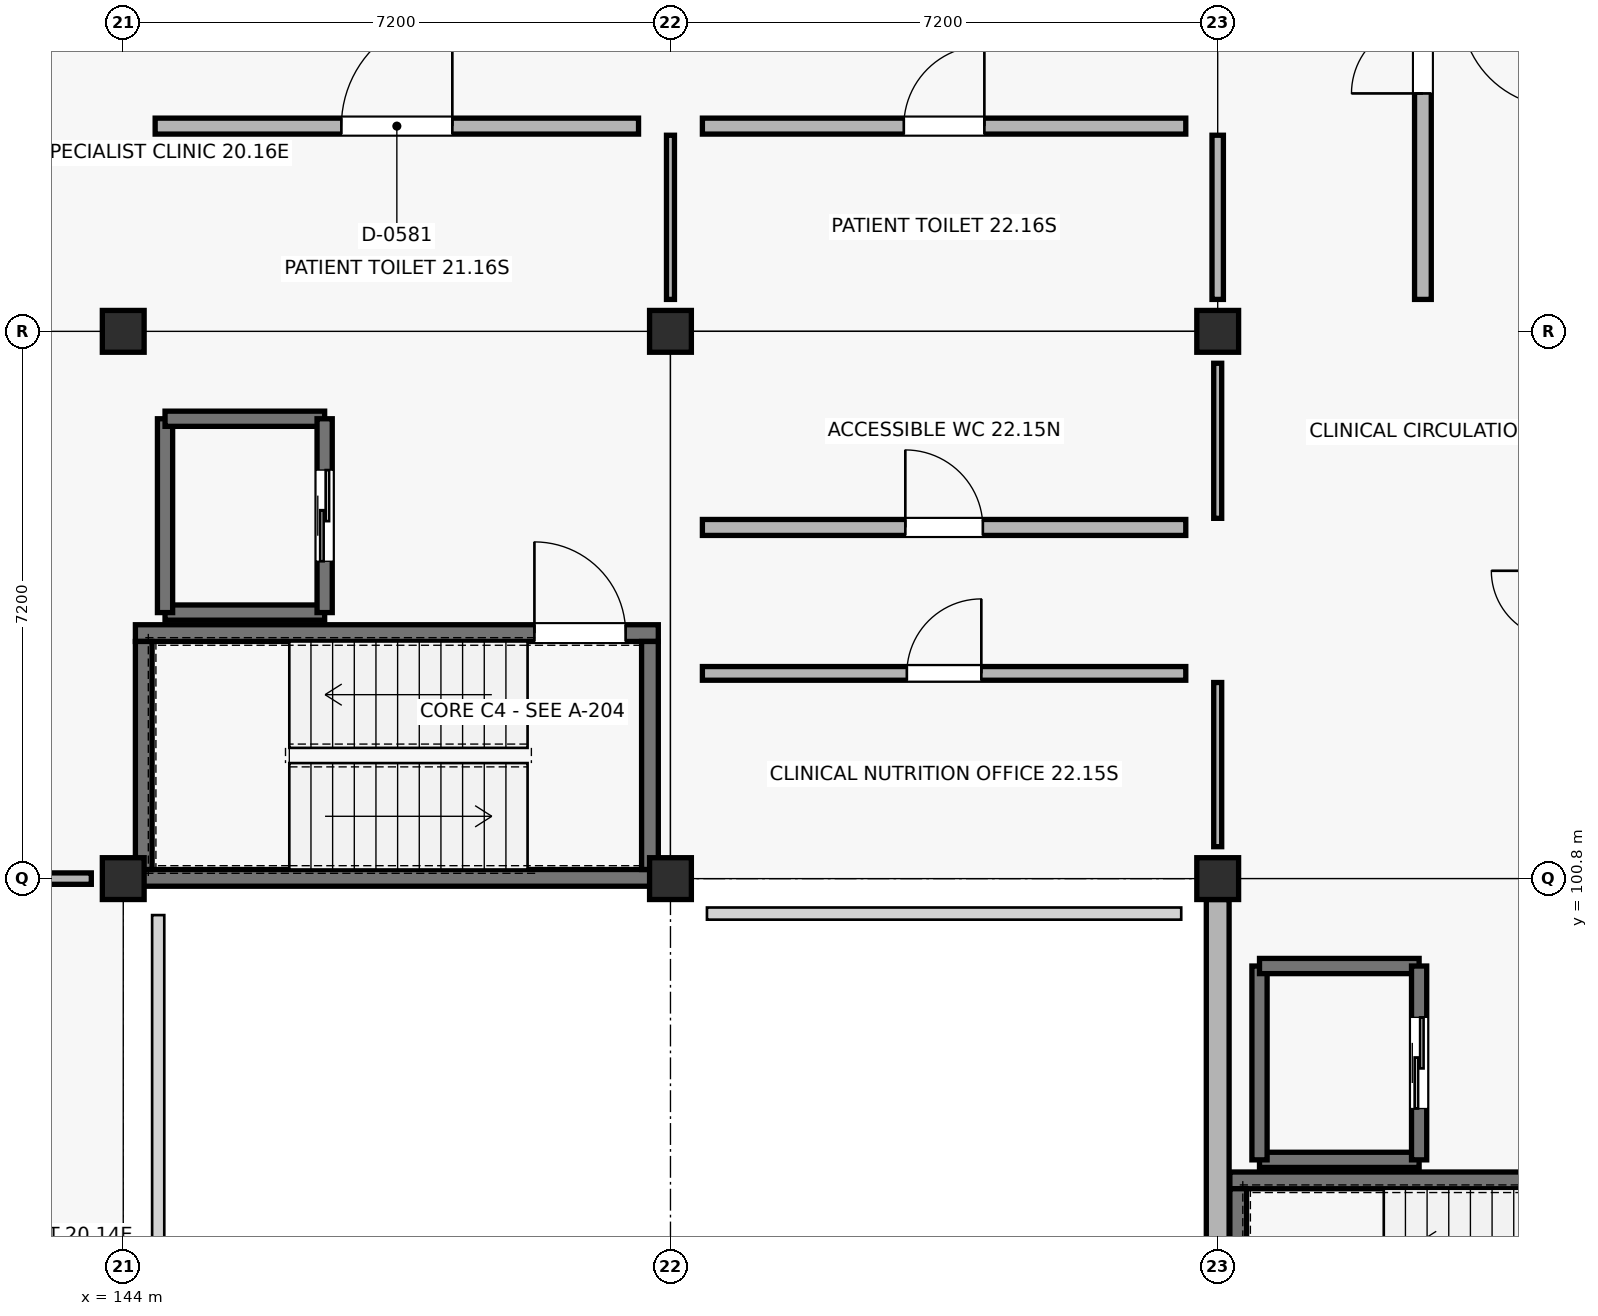
"""IFC4 building model, lengths in metres.
Left out: names, types, materials, properties, quantities, classifications, styles, units other than length and angle.
Written with IfcOpenShell. Run it as: python <this file> out.ifc"""

import sys

from ifc_helpers import new_model, si_unit, direction, frame, frame_2d, origin, origin_2d, place, context, subcontext, project, spatial, rectangle, extrude, element, fill, save


model = new_model("IFC4")
c1 = context("Model", 3, precision=1e-05, world=origin(), true_north=direction((0.0, 1.0)))
c2 = subcontext(c1, "Body", "Model", "MODEL_VIEW")
j1 = project(units=[si_unit("LENGTHUNIT", "METRE"), si_unit("PLANEANGLEUNIT", "RADIAN")], contexts=[c1])
p1 = place(None, origin())
s1 = spatial("IfcSite", under=j1, at=p1, CompositionType="ELEMENT")
p2 = place(p1, origin())
s2 = spatial("IfcBuilding", under=s1, at=p2, CompositionType="ELEMENT")
p3 = place(p2, frame((0.0, 0.0, 13.5)))
s3 = spatial("IfcBuildingStorey", under=s2, at=p3, CompositionType="ELEMENT", Elevation=13.5)
for number, where, z_axis, x_axis in (
    (1, (144.0, 100.8, 0.0), (0.0, 0.0, 1.0), (1.0, 0.0, 0.0)),
    (2, (144.0, 108.0, 0.0), (0.0, 0.0, 1.0), (1.0, 0.0, 0.0)),
    (3, (151.2, 100.8, 0.0), (0.0, 0.0, 1.0), (1.0, 0.0, 0.0)),
    (4, (151.2, 108.0, 0.0), (0.0, 0.0, 1.0), (1.0, 0.0, 0.0)),
    (5, (158.4, 100.8, 0.0), (0.0, 0.0, 1.0), (1.0, 0.0, 0.0)),
    (6, (158.4, 108.0, 0.0), (0.0, 0.0, 1.0), (1.0, 0.0, 0.0)),
):
    element("IfcColumn", number, at=place(p3, frame(where, z_axis=z_axis, x_axis=x_axis)), inside=s3, PredefinedType="COLUMN", context=c2, shape_type="SweptSolid", body=[
        extrude(rectangle(XDim=0.55, YDim=0.55, at=origin_2d()), origin(), (0.0, 0.0, 1.0), 4.05),
    ])
p4 = place(p3, frame((158.4, 100.525, 0.0), z_axis=(0.0, 0.0, 1.0), x_axis=(0.0, -1.0, 0.0)))
e7 = element("IfcWall", 7, at=p4, inside=s3, PredefinedType="STANDARD", context=c2, shape_type="SweptSolid", body=[
    extrude(rectangle(XDim=6.65, YDim=0.3, at=frame_2d((3.325, 0.0))), origin(), (0.0, 0.0, 1.0), 3.24),
])
p5 = place(p3, frame((158.56, 96.83, 0.0), z_axis=(0.0, 0.0, 1.0), x_axis=(1.0, 0.0, 0.0)))
e8 = element("IfcWall", 8, at=p5, inside=s3, PredefinedType="SHEAR", context=c2, shape_type="SweptSolid", body=[
    extrude(rectangle(XDim=6.88, YDim=0.22, at=frame_2d((3.44, 0.0))), origin(), (0.0, 0.0, 1.0), 3.79),
])
p6 = place(p5, frame((5.25, 0.0, 0.0)))
e9 = element("IfcOpeningElement", 9, at=p6, cuts=e8, PredefinedType="OPENING", context=c2, shape_type="SweptSolid", body=[
    extrude(rectangle(XDim=1.2, YDim=2.15, at=frame_2d((0.6, 1.075))), frame((0.0, 0.12, 0.0), z_axis=(0.0, -1.0, 0.0), x_axis=(1.0, 0.0, 0.0)), (0.0, 0.0, 1.0), 0.24),
])
p7 = place(p3, frame((158.67, 93.72, 0.0), z_axis=(0.0, 0.0, 1.0), x_axis=(0.0, 1.0, 0.0)))
e10 = element("IfcWall", 10, at=p7, inside=s3, PredefinedType="SHEAR", context=c2, shape_type="SweptSolid", body=[
    extrude(rectangle(XDim=3.0, YDim=0.22, at=frame_2d((1.5, 0.0))), origin(), (0.0, 0.0, 1.0), 3.79),
])
p8 = place(p3, frame((158.95, 97.1, 0.0), z_axis=(0.0, 0.0, 1.0), x_axis=(1.0, 0.0, 0.0)))
e11 = element("IfcWall", 11, at=p8, inside=s3, PredefinedType="SHEAR", context=c2, shape_type="SweptSolid", body=[
    extrude(rectangle(XDim=2.1, YDim=0.2, at=frame_2d((1.05, 0.0))), origin(), (0.0, 0.0, 1.0), 3.79),
])
p9 = place(p3, frame((158.95, 97.1, 0.0), z_axis=(0.0, 0.0, 1.0), x_axis=(0.0, 1.0, 0.0)))
e12 = element("IfcWall", 12, at=p9, inside=s3, PredefinedType="SHEAR", context=c2, shape_type="SweptSolid", body=[
    extrude(rectangle(XDim=2.55, YDim=0.2, at=frame_2d((1.275, 0.0))), origin(), (0.0, 0.0, 1.0), 3.79),
])
p10 = place(p3, frame((158.95, 99.65, 0.0), z_axis=(0.0, 0.0, 1.0), x_axis=(1.0, 0.0, 0.0)))
e13 = element("IfcWall", 13, at=p10, inside=s3, PredefinedType="SHEAR", context=c2, shape_type="SweptSolid", body=[
    extrude(rectangle(XDim=2.1, YDim=0.2, at=frame_2d((1.05, 0.0))), origin(), (0.0, 0.0, 1.0), 3.79),
])
p11 = place(p3, frame((161.05, 97.1, 0.0), z_axis=(0.0, 0.0, 1.0), x_axis=(0.0, 1.0, 0.0)))
e14 = element("IfcWall", 14, at=p11, inside=s3, PredefinedType="SHEAR", context=c2, shape_type="SweptSolid", body=[
    extrude(rectangle(XDim=2.55, YDim=0.2, at=frame_2d((1.275, 0.0))), origin(), (0.0, 0.0, 1.0), 3.79),
])
p12 = place(p11, frame((0.675, 0.0, 0.0)))
e15 = element("IfcOpeningElement", 15, at=p12, cuts=e14, PredefinedType="OPENING", context=c2, shape_type="SweptSolid", body=[
    extrude(rectangle(XDim=1.2, YDim=2.15, at=frame_2d((0.6, 1.075))), frame((0.0, 0.11, 0.0), z_axis=(0.0, -1.0, 0.0), x_axis=(1.0, 0.0, 0.0)), (0.0, 0.0, 1.0), 0.22),
])
p13 = place(p3, frame((144.16, 100.81, 0.0), z_axis=(0.0, 0.0, 1.0), x_axis=(1.0, 0.0, 0.0)))
e16 = element("IfcWall", 16, at=p13, inside=s3, PredefinedType="SHEAR", context=c2, shape_type="SweptSolid", body=[
    extrude(rectangle(XDim=6.88, YDim=0.22, at=frame_2d((3.44, 0.0))), origin(), (0.0, 0.0, 1.0), 3.79),
])
p14 = place(p3, frame((144.16, 104.03, 0.0), z_axis=(0.0, 0.0, 1.0), x_axis=(1.0, 0.0, 0.0)))
e17 = element("IfcWall", 17, at=p14, inside=s3, PredefinedType="SHEAR", context=c2, shape_type="SweptSolid", body=[
    extrude(rectangle(XDim=6.88, YDim=0.22, at=frame_2d((3.44, 0.0))), origin(), (0.0, 0.0, 1.0), 3.79),
])
p15 = place(p14, frame((5.25, 0.0, 0.0)))
e18 = element("IfcOpeningElement", 18, at=p15, cuts=e17, PredefinedType="OPENING", context=c2, shape_type="SweptSolid", body=[
    extrude(rectangle(XDim=1.2, YDim=2.15, at=frame_2d((0.6, 1.075))), frame((0.0, 0.12, 0.0), z_axis=(0.0, -1.0, 0.0), x_axis=(1.0, 0.0, 0.0)), (0.0, 0.0, 1.0), 0.24),
])
for number, where, z_axis, x_axis in (
    (19, (144.27, 100.92, 0.0), (0.0, 0.0, 1.0), (0.0, 1.0, 0.0)),
    (20, (150.93, 100.92, 0.0), (0.0, 0.0, 1.0), (0.0, 1.0, 0.0)),
):
    element("IfcWall", number, at=place(p3, frame(where, z_axis=z_axis, x_axis=x_axis)), inside=s3, PredefinedType="SHEAR", context=c2, shape_type="SweptSolid", body=[
        extrude(rectangle(XDim=3.0, YDim=0.22, at=frame_2d((1.5, 0.0))), origin(), (0.0, 0.0, 1.0), 3.79),
    ])
p16 = place(p3, frame((144.55, 104.3, 0.0), z_axis=(0.0, 0.0, 1.0), x_axis=(1.0, 0.0, 0.0)))
e21 = element("IfcWall", 21, at=p16, inside=s3, PredefinedType="SHEAR", context=c2, shape_type="SweptSolid", body=[
    extrude(rectangle(XDim=2.1, YDim=0.2, at=frame_2d((1.05, 0.0))), origin(), (0.0, 0.0, 1.0), 3.79),
])
p17 = place(p3, frame((144.55, 104.3, 0.0), z_axis=(0.0, 0.0, 1.0), x_axis=(0.0, 1.0, 0.0)))
e22 = element("IfcWall", 22, at=p17, inside=s3, PredefinedType="SHEAR", context=c2, shape_type="SweptSolid", body=[
    extrude(rectangle(XDim=2.55, YDim=0.2, at=frame_2d((1.275, 0.0))), origin(), (0.0, 0.0, 1.0), 3.79),
])
p18 = place(p3, frame((144.55, 106.85, 0.0), z_axis=(0.0, 0.0, 1.0), x_axis=(1.0, 0.0, 0.0)))
e23 = element("IfcWall", 23, at=p18, inside=s3, PredefinedType="SHEAR", context=c2, shape_type="SweptSolid", body=[
    extrude(rectangle(XDim=2.1, YDim=0.2, at=frame_2d((1.05, 0.0))), origin(), (0.0, 0.0, 1.0), 3.79),
])
p19 = place(p3, frame((146.65, 104.3, 0.0), z_axis=(0.0, 0.0, 1.0), x_axis=(0.0, 1.0, 0.0)))
e24 = element("IfcWall", 24, at=p19, inside=s3, PredefinedType="SHEAR", context=c2, shape_type="SweptSolid", body=[
    extrude(rectangle(XDim=2.55, YDim=0.2, at=frame_2d((1.275, 0.0))), origin(), (0.0, 0.0, 1.0), 3.79),
])
p20 = place(p19, frame((0.675, 0.0, 0.0)))
e25 = element("IfcOpeningElement", 25, at=p20, cuts=e24, PredefinedType="OPENING", context=c2, shape_type="SweptSolid", body=[
    extrude(rectangle(XDim=1.2, YDim=2.15, at=frame_2d((0.6, 1.075))), frame((0.0, 0.11, 0.0), z_axis=(0.0, -1.0, 0.0), x_axis=(1.0, 0.0, 0.0)), (0.0, 0.0, 1.0), 0.22),
])
p21 = place(p3, frame((141.42, 100.8, 0.0), z_axis=(0.0, 0.0, 1.0), x_axis=(1.0, 0.0, 0.0)))
e26 = element("IfcWall", 26, at=p21, inside=s3, PredefinedType="PARTITIONING", context=c2, shape_type="SweptSolid", body=[
    extrude(rectangle(XDim=2.16, YDim=0.15, at=frame_2d((1.08, 0.0))), origin(), (0.0, 0.0, 1.0), 2.93),
])
p22 = place(p3, frame((144.42, 110.7, 0.0), z_axis=(0.0, 0.0, 1.0), x_axis=(1.0, 0.0, 0.0)))
e27 = element("IfcWall", 27, at=p22, inside=s3, PredefinedType="PLUMBINGWALL", context=c2, shape_type="SweptSolid", body=[
    extrude(rectangle(XDim=6.36, YDim=0.21, at=frame_2d((3.18, 0.0))), origin(), (0.0, 0.0, 1.0), 2.93),
])
p23 = place(p22, frame((2.45, 0.0, 0.0)))
e28 = element("IfcOpeningElement", 28, at=p23, cuts=e27, PredefinedType="OPENING", context=c2, shape_type="SweptSolid", body=[
    extrude(rectangle(XDim=1.46, YDim=2.04, at=frame_2d((0.73, 1.02))), frame((0.0, 0.115, 0.0), z_axis=(0.0, -1.0, 0.0), x_axis=(1.0, 0.0, 0.0)), (0.0, 0.0, 1.0), 0.23),
])
p24 = place(p3, frame((151.2, 108.42, 0.0), z_axis=(0.0, 0.0, 1.0), x_axis=(0.0, 1.0, 0.0)))
e29 = element("IfcWall", 29, at=p24, inside=s3, PredefinedType="PARTITIONING", context=c2, shape_type="SweptSolid", body=[
    extrude(rectangle(XDim=2.16, YDim=0.105, at=frame_2d((1.08, 0.0))), origin(), (0.0, 0.0, 1.0), 2.93),
])
p25 = place(p3, frame((151.62, 103.5, 0.0), z_axis=(0.0, 0.0, 1.0), x_axis=(1.0, 0.0, 0.0)))
e30 = element("IfcWall", 30, at=p25, inside=s3, PredefinedType="PARTITIONING", context=c2, shape_type="SweptSolid", body=[
    extrude(rectangle(XDim=6.36, YDim=0.18, at=frame_2d((3.18, 0.0))), origin(), (0.0, 0.0, 1.0), 2.93),
])
p26 = place(p25, frame((2.69, 0.0, 0.0)))
e31 = element("IfcOpeningElement", 31, at=p26, cuts=e30, PredefinedType="OPENING", context=c2, shape_type="SweptSolid", body=[
    extrude(rectangle(XDim=0.98, YDim=2.09, at=frame_2d((0.49, 1.045))), frame((0.0, 0.1, 0.0), z_axis=(0.0, -1.0, 0.0), x_axis=(1.0, 0.0, 0.0)), (0.0, 0.0, 1.0), 0.2),
])
p27 = place(p3, frame((158.4, 101.22, 0.0), z_axis=(0.0, 0.0, 1.0), x_axis=(0.0, 1.0, 0.0)))
e32 = element("IfcWall", 32, at=p27, inside=s3, PredefinedType="PARTITIONING", context=c2, shape_type="SweptSolid", body=[
    extrude(rectangle(XDim=2.16, YDim=0.105, at=frame_2d((1.08, 0.0))), origin(), (0.0, 0.0, 1.0), 2.93),
])
p28 = place(p3, frame((151.62, 105.42, 0.0), z_axis=(0.0, 0.0, 1.0), x_axis=(1.0, 0.0, 0.0)))
e33 = element("IfcWall", 33, at=p28, inside=s3, PredefinedType="PLUMBINGWALL", context=c2, shape_type="SweptSolid", body=[
    extrude(rectangle(XDim=6.36, YDim=0.21, at=frame_2d((3.18, 0.0))), origin(), (0.0, 0.0, 1.0), 2.93),
])
p29 = place(p28, frame((2.67, 0.0, 0.0)))
e34 = element("IfcOpeningElement", 34, at=p29, cuts=e33, PredefinedType="OPENING", context=c2, shape_type="SweptSolid", body=[
    extrude(rectangle(XDim=1.02, YDim=2.09, at=frame_2d((0.51, 1.045))), frame((0.0, 0.115, 0.0), z_axis=(0.0, -1.0, 0.0), x_axis=(1.0, 0.0, 0.0)), (0.0, 0.0, 1.0), 0.23),
])
p30 = place(p3, frame((158.4, 105.54, 0.0), z_axis=(0.0, 0.0, 1.0), x_axis=(0.0, 1.0, 0.0)))
e35 = element("IfcWall", 35, at=p30, inside=s3, PredefinedType="PARTITIONING", context=c2, shape_type="SweptSolid", body=[
    extrude(rectangle(XDim=2.04, YDim=0.105, at=frame_2d((1.02, 0.0))), origin(), (0.0, 0.0, 1.0), 2.93),
])
p31 = place(p3, frame((151.62, 110.7, 0.0), z_axis=(0.0, 0.0, 1.0), x_axis=(1.0, 0.0, 0.0)))
e36 = element("IfcWall", 36, at=p31, inside=s3, PredefinedType="PLUMBINGWALL", context=c2, shape_type="SweptSolid", body=[
    extrude(rectangle(XDim=6.36, YDim=0.21, at=frame_2d((3.18, 0.0))), origin(), (0.0, 0.0, 1.0), 2.93),
])
p32 = place(p31, frame((2.65, 0.0, 0.0)))
e37 = element("IfcOpeningElement", 37, at=p32, cuts=e36, PredefinedType="OPENING", context=c2, shape_type="SweptSolid", body=[
    extrude(rectangle(XDim=1.06, YDim=2.09, at=frame_2d((0.53, 1.045))), frame((0.0, 0.115, 0.0), z_axis=(0.0, -1.0, 0.0), x_axis=(1.0, 0.0, 0.0)), (0.0, 0.0, 1.0), 0.23),
])
p33 = place(p3, frame((158.4, 108.42, 0.0), z_axis=(0.0, 0.0, 1.0), x_axis=(0.0, 1.0, 0.0)))
e38 = element("IfcWall", 38, at=p33, inside=s3, PredefinedType="PARTITIONING", context=c2, shape_type="SweptSolid", body=[
    extrude(rectangle(XDim=2.16, YDim=0.15, at=frame_2d((1.08, 0.0))), origin(), (0.0, 0.0, 1.0), 2.93),
])
p34 = place(p3, frame((161.1, 108.42, 0.0), z_axis=(0.0, 0.0, 1.0), x_axis=(0.0, 1.0, 0.0)))
e39 = element("IfcWall", 39, at=p34, inside=s3, PredefinedType="SOLIDWALL", context=c2, shape_type="SweptSolid", body=[
    extrude(rectangle(XDim=6.36, YDim=0.22, at=frame_2d((3.18, 0.0))), origin(), (0.0, 0.0, 1.0), 2.93),
])
p35 = place(p34, frame((2.71, 0.0, 0.0)))
e40 = element("IfcOpeningElement", 40, at=p35, cuts=e39, PredefinedType="OPENING", context=c2, shape_type="SweptSolid", body=[
    extrude(rectangle(XDim=0.94, YDim=2.14, at=frame_2d((0.47, 1.07))), frame((0.0, 0.12, 0.0), z_axis=(0.0, -1.0, 0.0), x_axis=(1.0, 0.0, 0.0)), (0.0, 0.0, 1.0), 0.24),
])
p36 = place(p12, origin())
e41 = element("IfcDoor", 41, at=p36, inside=s3, OperationType="SLIDING_TO_LEFT", PredefinedType="DOOR", context=c2, shape_type="SweptSolid", body=[
    extrude(rectangle(XDim=1.2, YDim=2.15, at=frame_2d((0.6, 1.075))), frame((0.0, 0.025, 0.0), z_axis=(0.0, -1.0, 0.0), x_axis=(1.0, 0.0, 0.0)), (0.0, 0.0, 1.0), 0.05),
])
fill(e15, e41)
p37 = place(p15, origin())
e42 = element("IfcDoor", 42, at=p37, inside=s3, OperationType="SINGLE_SWING_LEFT", PredefinedType="DOOR", context=c2, shape_type="SweptSolid", body=[
    extrude(rectangle(XDim=1.2, YDim=2.15, at=frame_2d((0.6, 1.075))), frame((0.0, 0.025, 0.0), z_axis=(0.0, -1.0, 0.0), x_axis=(1.0, 0.0, 0.0)), (0.0, 0.0, 1.0), 0.05),
])
fill(e18, e42)
p38 = place(p20, origin())
e43 = element("IfcDoor", 43, at=p38, inside=s3, OperationType="SLIDING_TO_LEFT", PredefinedType="DOOR", context=c2, shape_type="SweptSolid", body=[
    extrude(rectangle(XDim=1.2, YDim=2.15, at=frame_2d((0.6, 1.075))), frame((0.0, 0.025, 0.0), z_axis=(0.0, -1.0, 0.0), x_axis=(1.0, 0.0, 0.0)), (0.0, 0.0, 1.0), 0.05),
])
fill(e25, e43)
p39 = place(p23, origin())
e44 = element("IfcDoor", 44, at=p39, inside=s3, OperationType="SINGLE_SWING_RIGHT", PredefinedType="DOOR", context=c2, shape_type="SweptSolid", body=[
    extrude(rectangle(XDim=1.46, YDim=2.04, at=frame_2d((0.73, 1.02))), frame((0.0, 0.025, 0.0), z_axis=(0.0, -1.0, 0.0), x_axis=(1.0, 0.0, 0.0)), (0.0, 0.0, 1.0), 0.05),
])
fill(e28, e44)
p40 = place(p26, origin())
e45 = element("IfcDoor", 45, at=p40, inside=s3, OperationType="SINGLE_SWING_RIGHT", PredefinedType="DOOR", context=c2, shape_type="SweptSolid", body=[
    extrude(rectangle(XDim=0.98, YDim=2.09, at=frame_2d((0.49, 1.045))), frame((0.0, 0.025, 0.0), z_axis=(0.0, -1.0, 0.0), x_axis=(1.0, 0.0, 0.0)), (0.0, 0.0, 1.0), 0.05),
])
fill(e31, e45)
p41 = place(p29, origin())
e46 = element("IfcDoor", 46, at=p41, inside=s3, OperationType="SINGLE_SWING_LEFT", PredefinedType="DOOR", context=c2, shape_type="SweptSolid", body=[
    extrude(rectangle(XDim=1.02, YDim=2.09, at=frame_2d((0.51, 1.045))), frame((0.0, 0.025, 0.0), z_axis=(0.0, -1.0, 0.0), x_axis=(1.0, 0.0, 0.0)), (0.0, 0.0, 1.0), 0.05),
])
fill(e34, e46)
p42 = place(p32, origin())
e47 = element("IfcDoor", 47, at=p42, inside=s3, OperationType="SINGLE_SWING_RIGHT", PredefinedType="DOOR", context=c2, shape_type="SweptSolid", body=[
    extrude(rectangle(XDim=1.06, YDim=2.09, at=frame_2d((0.53, 1.045))), frame((0.0, 0.025, 0.0), z_axis=(0.0, -1.0, 0.0), x_axis=(1.0, 0.0, 0.0)), (0.0, 0.0, 1.0), 0.05),
])
fill(e37, e47)
p43 = place(p35, origin())
e48 = element("IfcDoor", 48, at=p43, inside=s3, OperationType="SINGLE_SWING_LEFT", PredefinedType="DOOR", context=c2, shape_type="SweptSolid", body=[
    extrude(rectangle(XDim=0.94, YDim=2.14, at=frame_2d((0.47, 1.07))), frame((0.0, 0.025, 0.0), z_axis=(0.0, -1.0, 0.0), x_axis=(1.0, 0.0, 0.0)), (0.0, 0.0, 1.0), 0.05),
])
fill(e40, e48)
save(model, sys.argv[1])
